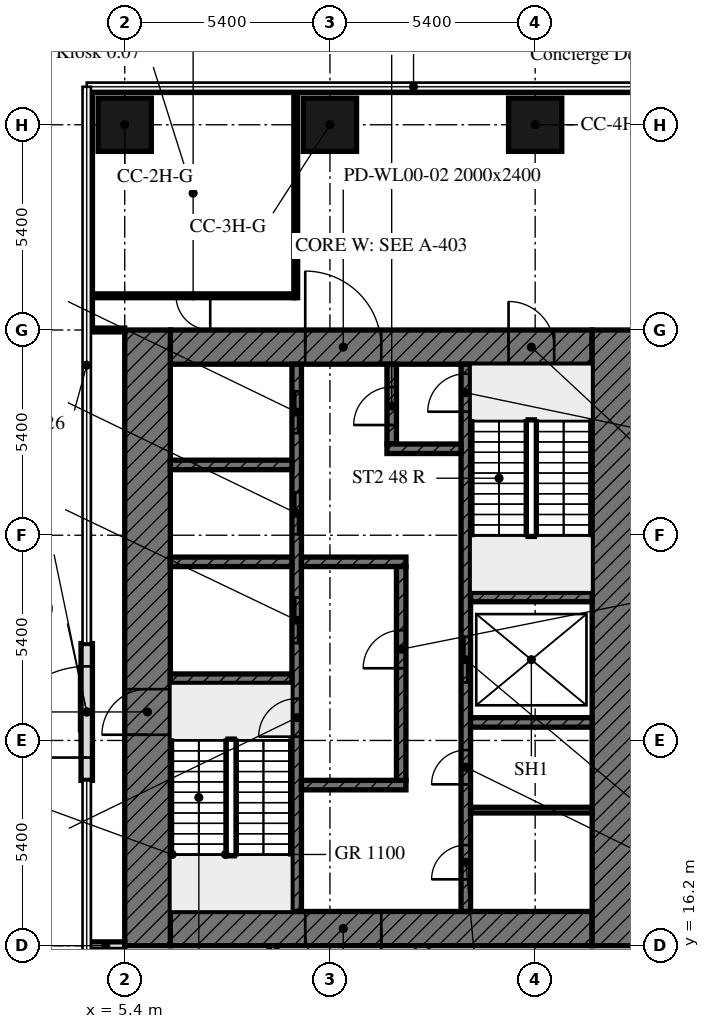
"""IFC4 building model, lengths in metres.
Left out: names, types, materials, properties, quantities, classifications, styles, units other than length and angle.
Written with IfcOpenShell. Run it as: python <this file> out.ifc"""

import sys

from ifc_helpers import new_model, si_unit, direction, frame, frame_2d, origin, origin_2d, place, context, subcontext, project, spatial, rectangle, extrude, element, fill, save


model = new_model("IFC4")
c1 = context("Model", 3, precision=1e-05, world=origin(), true_north=direction((0.0, 1.0)))
c2 = subcontext(c1, "Body", "Model", "MODEL_VIEW")
j1 = project(units=[si_unit("LENGTHUNIT", "METRE"), si_unit("PLANEANGLEUNIT", "RADIAN")], contexts=[c1])
p1 = place(None, origin())
s1 = spatial("IfcSite", under=j1, at=p1, CompositionType="ELEMENT")
p2 = place(p1, origin())
s2 = spatial("IfcBuilding", under=s1, at=p2, CompositionType="ELEMENT")
p3 = place(p2, origin())
s3 = spatial("IfcBuildingStorey", under=s2, at=p3, CompositionType="ELEMENT", Elevation=0.0)
for number, where, z_axis, x_axis in (
    (1, (5.4, 37.8, 0.0), (0.0, 0.0, 1.0), (1.0, 0.0, 0.0)),
    (2, (10.8, 37.8, 0.0), (0.0, 0.0, 1.0), (1.0, 0.0, 0.0)),
    (3, (16.2, 37.8, 0.0), (0.0, 0.0, 1.0), (1.0, 0.0, 0.0)),
):
    element("IfcColumn", number, at=place(p3, frame(where, z_axis=z_axis, x_axis=x_axis)), inside=s3, PredefinedType="COLUMN", context=c2, shape_type="SweptSolid", body=[
        extrude(rectangle(XDim=1.4, YDim=1.4, at=origin_2d()), origin(), (0.0, 0.0, 1.0), 8.0),
    ])
p4 = place(p3, frame((4.4, 20.55, 0.0), z_axis=(0.0, 0.0, 1.0), x_axis=(0.0, 1.0, 0.0)))
e4 = element("IfcWall", 4, at=p4, inside=s3, PredefinedType="SOLIDWALL", context=c2, shape_type="SweptSolid", body=[
    extrude(rectangle(XDim=3.6, YDim=0.3, at=frame_2d((1.8, 0.0))), origin(), (0.0, 0.0, 1.0), 8.0),
])
p5 = place(p4, frame((0.6, 0.0, 0.0)))
e5 = element("IfcOpeningElement", 5, at=p5, cuts=e4, PredefinedType="OPENING", context=c2, shape_type="SweptSolid", body=[
    extrude(rectangle(XDim=2.4, YDim=2.7, at=frame_2d((1.2, 1.35))), frame((0.0, 0.16, 0.0), z_axis=(0.0, -1.0, 0.0), x_axis=(1.0, 0.0, 0.0)), (0.0, 0.0, 1.0), 0.32),
])
p6 = place(p3, frame((17.7, 16.65, 0.0), z_axis=(0.0, 0.0, 1.0), x_axis=(-1.0, 0.0, 0.0)))
e6 = element("IfcWall", 6, at=p6, inside=s3, PredefinedType="SOLIDWALL", context=c2, shape_type="SweptSolid", body=[
    extrude(rectangle(XDim=11.1, YDim=0.9, at=frame_2d((5.55, 0.0))), origin(), (0.0, 0.0, 1.0), 8.0),
])
p7 = place(p6, frame((5.55, 0.0, 0.0)))
e7 = element("IfcOpeningElement", 7, at=p7, cuts=e6, PredefinedType="OPENING", context=c2, shape_type="SweptSolid", body=[
    extrude(rectangle(XDim=2.0, YDim=2.4, at=frame_2d((1.0, 1.2))), frame((0.0, 0.45, 0.0), z_axis=(0.0, -1.0, 0.0), x_axis=(1.0, 0.0, 0.0)), (0.0, 0.0, 1.0), 0.9),
])
p8 = place(p3, frame((6.6, 31.95, 0.0), z_axis=(0.0, 0.0, 1.0), x_axis=(1.0, 0.0, 0.0)))
e8 = element("IfcWall", 8, at=p8, inside=s3, PredefinedType="SOLIDWALL", context=c2, shape_type="SweptSolid", body=[
    extrude(rectangle(XDim=11.1, YDim=0.9, at=frame_2d((5.55, 0.0))), origin(), (0.0, 0.0, 1.0), 8.0),
])
p9 = place(p8, frame((3.55, 0.0, 0.0)))
e9 = element("IfcOpeningElement", 9, at=p9, cuts=e8, PredefinedType="OPENING", context=c2, shape_type="SweptSolid", body=[
    extrude(rectangle(XDim=2.0, YDim=2.4, at=frame_2d((1.0, 1.2))), frame((0.0, 0.45, 0.0), z_axis=(0.0, -1.0, 0.0), x_axis=(1.0, 0.0, 0.0)), (0.0, 0.0, 1.0), 0.9),
])
p10 = place(p8, frame((8.9, 0.0, 0.0)))
e10 = element("IfcOpeningElement", 10, at=p10, cuts=e8, PredefinedType="OPENING", context=c2, shape_type="SweptSolid", body=[
    extrude(rectangle(XDim=1.2, YDim=2.1, at=frame_2d((0.6, 1.05))), frame((0.0, 0.45, 0.0), z_axis=(0.0, -1.0, 0.0), x_axis=(1.0, 0.0, 0.0)), (0.0, 0.0, 1.0), 0.9),
])
p11 = place(p3, frame((6.0, 16.2, 0.0), z_axis=(0.0, 0.0, 1.0), x_axis=(0.0, 1.0, 0.0)))
e11 = element("IfcWall", 11, at=p11, inside=s3, PredefinedType="SOLIDWALL", context=c2, shape_type="SweptSolid", body=[
    extrude(rectangle(XDim=16.2, YDim=1.2, at=frame_2d((8.1, 0.0))), origin(), (0.0, 0.0, 1.0), 8.0),
])
p12 = place(p11, frame((5.55, 0.0, 0.0)))
e12 = element("IfcOpeningElement", 12, at=p12, cuts=e11, PredefinedType="OPENING", context=c2, shape_type="SweptSolid", body=[
    extrude(rectangle(XDim=1.2, YDim=2.1, at=frame_2d((0.6, 1.05))), frame((0.0, 0.6, 0.0), z_axis=(0.0, -1.0, 0.0), x_axis=(1.0, 0.0, 0.0)), (0.0, 0.0, 1.0), 1.2),
])
p13 = place(p3, frame((18.3, 32.4, 0.0), z_axis=(0.0, 0.0, 1.0), x_axis=(0.0, -1.0, 0.0)))
e13 = element("IfcWall", 13, at=p13, inside=s3, PredefinedType="SOLIDWALL", context=c2, shape_type="SweptSolid", body=[
    extrude(rectangle(XDim=16.2, YDim=1.2, at=frame_2d((8.1, 0.0))), origin(), (0.0, 0.0, 1.0), 8.0),
])
p14 = place(p3, frame((9.925, 17.1, 0.0), z_axis=(0.0, 0.0, 1.0), x_axis=(0.0, 1.0, 0.0)))
e14 = element("IfcWall", 14, at=p14, inside=s3, PredefinedType="SOLIDWALL", context=c2, shape_type="SweptSolid", body=[
    extrude(rectangle(XDim=14.4, YDim=0.25, at=frame_2d((7.2, 0.0))), origin(), (0.0, 0.0, 1.0), 8.0),
])
p15 = place(p14, frame((4.6, 0.0, 0.0)))
e15 = element("IfcOpeningElement", 15, at=p15, cuts=e14, PredefinedType="OPENING", context=c2, shape_type="SweptSolid", body=[
    extrude(rectangle(XDim=1.0, YDim=2.1, at=frame_2d((0.5, 1.05))), frame((0.0, 0.125, 0.0), z_axis=(0.0, -1.0, 0.0), x_axis=(1.0, 0.0, 0.0)), (0.0, 0.0, 1.0), 0.25),
])
p16 = place(p14, frame((7.062, 0.0, 0.0)))
e16 = element("IfcOpeningElement", 16, at=p16, cuts=e14, PredefinedType="OPENING", context=c2, shape_type="SweptSolid", body=[
    extrude(rectangle(XDim=1.2, YDim=2.1, at=frame_2d((0.6, 1.05))), frame((0.0, 0.125, 0.0), z_axis=(0.0, -1.0, 0.0), x_axis=(1.0, 0.0, 0.0)), (0.0, 0.0, 1.0), 0.25),
])
p17 = place(p14, frame((9.925, 0.0, 0.0)))
e17 = element("IfcOpeningElement", 17, at=p17, cuts=e14, PredefinedType="OPENING", context=c2, shape_type="SweptSolid", body=[
    extrude(rectangle(XDim=1.1, YDim=2.1, at=frame_2d((0.55, 1.05))), frame((0.0, 0.125, 0.0), z_axis=(0.0, -1.0, 0.0), x_axis=(1.0, 0.0, 0.0)), (0.0, 0.0, 1.0), 0.25),
])
p18 = place(p14, frame((12.587, 0.0, 0.0)))
e18 = element("IfcOpeningElement", 18, at=p18, cuts=e14, PredefinedType="OPENING", context=c2, shape_type="SweptSolid", body=[
    extrude(rectangle(XDim=1.1, YDim=2.1, at=frame_2d((0.55, 1.05))), frame((0.0, 0.125, 0.0), z_axis=(0.0, -1.0, 0.0), x_axis=(1.0, 0.0, 0.0)), (0.0, 0.0, 1.0), 0.25),
])
p19 = place(p3, frame((14.375, 17.1, 0.0), z_axis=(0.0, 0.0, 1.0), x_axis=(0.0, 1.0, 0.0)))
e19 = element("IfcWall", 19, at=p19, inside=s3, PredefinedType="SOLIDWALL", context=c2, shape_type="SweptSolid", body=[
    extrude(rectangle(XDim=14.4, YDim=0.25, at=frame_2d((7.2, 0.0))), origin(), (0.0, 0.0, 1.0), 8.0),
])
p20 = place(p19, frame((13.15, 0.0, 0.0)))
e20 = element("IfcOpeningElement", 20, at=p20, cuts=e19, PredefinedType="OPENING", context=c2, shape_type="SweptSolid", body=[
    extrude(rectangle(XDim=1.0, YDim=2.1, at=frame_2d((0.5, 1.05))), frame((0.0, 0.125, 0.0), z_axis=(0.0, -1.0, 0.0), x_axis=(1.0, 0.0, 0.0)), (0.0, 0.0, 1.0), 0.25),
])
p21 = place(p19, frame((6.025, 0.0, 0.0)))
e21 = element("IfcOpeningElement", 21, at=p21, cuts=e19, PredefinedType="OPENING", context=c2, shape_type="SweptSolid", body=[
    extrude(rectangle(XDim=1.2, YDim=2.1, at=frame_2d((0.6, 1.05))), frame((0.0, 0.125, 0.0), z_axis=(0.0, -1.0, 0.0), x_axis=(1.0, 0.0, 0.0)), (0.0, 0.0, 1.0), 0.25),
])
p22 = place(p19, frame((0.846, 0.0, 0.0)))
e22 = element("IfcOpeningElement", 22, at=p22, cuts=e19, PredefinedType="OPENING", context=c2, shape_type="SweptSolid", body=[
    extrude(rectangle(XDim=0.9, YDim=2.1, at=frame_2d((0.45, 1.05))), frame((0.0, 0.125, 0.0), z_axis=(0.0, -1.0, 0.0), x_axis=(1.0, 0.0, 0.0)), (0.0, 0.0, 1.0), 0.25),
])
p23 = place(p19, frame((3.346, 0.0, 0.0)))
e23 = element("IfcOpeningElement", 23, at=p23, cuts=e19, PredefinedType="OPENING", context=c2, shape_type="SweptSolid", body=[
    extrude(rectangle(XDim=0.9, YDim=2.1, at=frame_2d((0.45, 1.05))), frame((0.0, 0.125, 0.0), z_axis=(0.0, -1.0, 0.0), x_axis=(1.0, 0.0, 0.0)), (0.0, 0.0, 1.0), 0.25),
])
for number, where, z_axis, x_axis in (
    (24, (6.6, 23.225, 0.0), (0.0, 0.0, 1.0), (1.0, 0.0, 0.0)),
    (25, (14.5, 25.375, 0.0), (0.0, 0.0, 1.0), (1.0, 0.0, 0.0)),
    (26, (14.5, 22.075, 0.0), (0.0, 0.0, 1.0), (1.0, 0.0, 0.0)),
    (27, (6.6, 26.3, 0.0), (0.0, 0.0, 1.0), (1.0, 0.0, 0.0)),
):
    element("IfcWall", number, at=place(p3, frame(where, z_axis=z_axis, x_axis=x_axis)), inside=s3, PredefinedType="SOLIDWALL", context=c2, shape_type="SweptSolid", body=[
        extrude(rectangle(XDim=3.2, YDim=0.25, at=frame_2d((1.6, 0.0))), origin(), (0.0, 0.0, 1.0), 8.0),
    ])
for number, where, z_axis, x_axis in (
    (28, (10.05, 26.3, 0.0), (0.0, 0.0, 1.0), (1.0, 0.0, 0.0)),
    (29, (10.05, 20.425, 0.0), (0.0, 0.0, 1.0), (1.0, 0.0, 0.0)),
):
    element("IfcWall", number, at=place(p3, frame(where, z_axis=z_axis, x_axis=x_axis)), inside=s3, PredefinedType="SOLIDWALL", context=c2, shape_type="SweptSolid", body=[
        extrude(rectangle(XDim=2.75, YDim=0.25, at=frame_2d((1.375, 0.0))), origin(), (0.0, 0.0, 1.0), 8.0),
    ])
p24 = place(p3, frame((12.425, 29.4, 0.0), z_axis=(0.0, 0.0, 1.0), x_axis=(0.0, 1.0, 0.0)))
e30 = element("IfcWall", 30, at=p24, inside=s3, PredefinedType="SOLIDWALL", context=c2, shape_type="SweptSolid", body=[
    extrude(rectangle(XDim=2.1, YDim=0.25, at=frame_2d((1.05, 0.0))), origin(), (0.0, 0.0, 1.0), 8.0),
])
p25 = place(p24, frame((0.5, 0.0, 0.0)))
e31 = element("IfcOpeningElement", 31, at=p25, cuts=e30, PredefinedType="OPENING", context=c2, shape_type="SweptSolid", body=[
    extrude(rectangle(XDim=1.0, YDim=2.1, at=frame_2d((0.5, 1.05))), frame((0.0, 0.125, 0.0), z_axis=(0.0, -1.0, 0.0), x_axis=(1.0, 0.0, 0.0)), (0.0, 0.0, 1.0), 0.25),
])
p26 = place(p3, frame((12.3, 29.275, 0.0), z_axis=(0.0, 0.0, 1.0), x_axis=(1.0, 0.0, 0.0)))
e32 = element("IfcWall", 32, at=p26, inside=s3, PredefinedType="SOLIDWALL", context=c2, shape_type="SweptSolid", body=[
    extrude(rectangle(XDim=1.95, YDim=0.25, at=frame_2d((0.975, 0.0))), origin(), (0.0, 0.0, 1.0), 8.0),
])
p27 = place(p3, frame((12.675, 20.55, 0.0), z_axis=(0.0, 0.0, 1.0), x_axis=(0.0, 1.0, 0.0)))
e33 = element("IfcWall", 33, at=p27, inside=s3, PredefinedType="SOLIDWALL", context=c2, shape_type="SweptSolid", body=[
    extrude(rectangle(XDim=5.625, YDim=0.25, at=frame_2d((2.812, 0.0))), origin(), (0.0, 0.0, 1.0), 8.0),
])
p28 = place(p27, frame((2.95, 0.0, 0.0)))
e34 = element("IfcOpeningElement", 34, at=p28, cuts=e33, PredefinedType="OPENING", context=c2, shape_type="SweptSolid", body=[
    extrude(rectangle(XDim=1.0, YDim=2.1, at=frame_2d((0.5, 1.05))), frame((0.0, 0.125, 0.0), z_axis=(0.0, -1.0, 0.0), x_axis=(1.0, 0.0, 0.0)), (0.0, 0.0, 1.0), 0.25),
])
p29 = place(p3, frame((6.6, 28.85, 0.0), z_axis=(0.0, 0.0, 1.0), x_axis=(1.0, 0.0, 0.0)))
e35 = element("IfcWall", 35, at=p29, inside=s3, PredefinedType="SOLIDWALL", context=c2, shape_type="SweptSolid", body=[
    extrude(rectangle(XDim=3.2, YDim=0.25, at=frame_2d((1.6, 0.0))), origin(), (0.0, 0.0, 1.0), 8.0),
])
p30 = place(p3, frame((14.5, 19.767, 0.0), z_axis=(0.0, 0.0, 1.0), x_axis=(1.0, 0.0, 0.0)))
e36 = element("IfcWall", 36, at=p30, inside=s3, PredefinedType="PARTITIONING", context=c2, shape_type="SweptSolid", body=[
    extrude(rectangle(XDim=3.2, YDim=0.15, at=frame_2d((1.6, 0.0))), origin(), (0.0, 0.0, 1.0), 8.0),
])
p31 = place(p3, frame((9.3, 9.8, 0.0), z_axis=(0.0, 0.0, 1.0), x_axis=(0.0, 1.0, 0.0)))
e37 = element("IfcWall", 37, at=p31, inside=s3, PredefinedType="PARTITIONING", context=c2, shape_type="SweptSolid", body=[
    extrude(rectangle(XDim=6.4, YDim=0.2, at=frame_2d((3.2, 0.0))), origin(), (0.0, 0.0, 1.0), 7.25),
])
p32 = place(p31, frame((4.375, 0.0, 0.0)))
e38 = element("IfcOpeningElement", 38, at=p32, cuts=e37, PredefinedType="OPENING", context=c2, shape_type="SweptSolid", body=[
    extrude(rectangle(XDim=0.9, YDim=2.1, at=frame_2d((0.45, 1.05))), frame((0.0, 0.1, 0.0), z_axis=(0.0, -1.0, 0.0), x_axis=(1.0, 0.0, 0.0)), (0.0, 0.0, 1.0), 0.2),
])
p33 = place(p3, frame((5.4, 16.2, 0.0), z_axis=(0.0, 0.0, 1.0), x_axis=(-1.0, 0.0, 0.0)))
e39 = element("IfcWall", 39, at=p33, inside=s3, PredefinedType="PARTITIONING", context=c2, shape_type="SweptSolid", body=[
    extrude(rectangle(XDim=1.0, YDim=0.2, at=frame_2d((0.5, 0.0))), origin(), (0.0, 0.0, 1.0), 7.25),
])
p34 = place(p3, frame((4.5, 16.1, 0.0), z_axis=(0.0, 0.0, 1.0), x_axis=(0.0, -1.0, 0.0)))
e40 = element("IfcWall", 40, at=p34, inside=s3, PredefinedType="PARTITIONING", context=c2, shape_type="SweptSolid", body=[
    extrude(rectangle(XDim=6.3, YDim=0.2, at=frame_2d((3.15, 0.0))), origin(), (0.0, 0.0, 1.0), 7.25),
])
p35 = place(p3, frame((9.9, 38.65, 0.0), z_axis=(0.0, 0.0, 1.0), x_axis=(0.0, -1.0, 0.0)))
e41 = element("IfcWall", 41, at=p35, inside=s3, PredefinedType="PARTITIONING", context=c2, shape_type="SweptSolid", body=[
    extrude(rectangle(XDim=5.4, YDim=0.1, at=frame_2d((2.7, 0.0))), origin(), (0.0, 0.0, 1.0), 8.0),
])
p36 = place(p3, frame((9.85, 33.3, 0.0), z_axis=(0.0, 0.0, 1.0), x_axis=(-1.0, 0.0, 0.0)))
e42 = element("IfcWall", 42, at=p36, inside=s3, PredefinedType="PARTITIONING", context=c2, shape_type="SweptSolid", body=[
    extrude(rectangle(XDim=5.3, YDim=0.1, at=frame_2d((2.65, 0.0))), origin(), (0.0, 0.0, 1.0), 8.0),
])
p37 = place(p36, frame((2.2, 0.0, 0.0)))
e43 = element("IfcOpeningElement", 43, at=p37, cuts=e42, PredefinedType="OPENING", context=c2, shape_type="SweptSolid", body=[
    extrude(rectangle(XDim=0.9, YDim=2.1, at=frame_2d((0.45, 1.05))), frame((0.0, 0.05, 0.0), z_axis=(0.0, -1.0, 0.0), x_axis=(1.0, 0.0, 0.0)), (0.0, 0.0, 1.0), 0.1),
])
p38 = place(p3, frame((4.4, 32.4, 0.0), z_axis=(0.0, 0.0, 1.0), x_axis=(1.0, 0.0, 0.0)))
e44 = element("IfcWall", 44, at=p38, inside=s3, PredefinedType="PARTITIONING", context=c2, shape_type="SweptSolid", body=[
    extrude(rectangle(XDim=1.0, YDim=0.1, at=frame_2d((0.5, 0.0))), origin(), (0.0, 0.0, 1.0), 7.25),
])
p39 = place(p3, frame((21.6, 38.7, 0.0), z_axis=(0.0, 0.0, 1.0), x_axis=(-1.0, 0.0, 0.0)))
e45 = element("IfcWall", 45, at=p39, inside=s3, PredefinedType="PARTITIONING", context=c2, shape_type="SweptSolid", body=[
    extrude(rectangle(XDim=17.2, YDim=0.1, at=frame_2d((8.6, 0.0))), origin(), (0.0, 0.0, 1.0), 8.0),
])
p40 = place(p3, frame((4.5, 38.65, 0.0), z_axis=(0.0, 0.0, 1.0), x_axis=(0.0, -1.0, 0.0)))
e46 = element("IfcWall", 46, at=p40, inside=s3, PredefinedType="PARTITIONING", context=c2, shape_type="SweptSolid", body=[
    extrude(rectangle(XDim=6.2, YDim=0.1, at=frame_2d((3.1, 0.0))), origin(), (0.0, 0.0, 1.0), 8.0),
])
p41 = place(p5, origin())
e47 = element("IfcDoor", 47, at=p41, inside=s3, OperationType="DOUBLE_DOOR_DOUBLE_SWING", PredefinedType="DOOR", context=c2, shape_type="SweptSolid", body=[
    extrude(rectangle(XDim=2.4, YDim=2.7, at=frame_2d((1.2, 1.35))), frame((0.0, 0.025, 0.0), z_axis=(0.0, -1.0, 0.0), x_axis=(1.0, 0.0, 0.0)), (0.0, 0.0, 1.0), 0.05),
])
fill(e5, e47)
p42 = place(p7, origin())
e48 = element("IfcDoor", 48, at=p42, inside=s3, OperationType="DOUBLE_DOOR_SINGLE_SWING", PredefinedType="DOOR", context=c2, shape_type="SweptSolid", body=[
    extrude(rectangle(XDim=2.0, YDim=2.4, at=frame_2d((1.0, 1.2))), frame((0.0, 0.025, 0.0), z_axis=(0.0, -1.0, 0.0), x_axis=(1.0, 0.0, 0.0)), (0.0, 0.0, 1.0), 0.05),
])
fill(e7, e48)
p43 = place(p9, origin())
e49 = element("IfcDoor", 49, at=p43, inside=s3, OperationType="DOUBLE_DOOR_SINGLE_SWING", PredefinedType="DOOR", context=c2, shape_type="SweptSolid", body=[
    extrude(rectangle(XDim=2.0, YDim=2.4, at=frame_2d((1.0, 1.2))), frame((0.0, 0.025, 0.0), z_axis=(0.0, -1.0, 0.0), x_axis=(1.0, 0.0, 0.0)), (0.0, 0.0, 1.0), 0.05),
])
fill(e9, e49)
p44 = place(p15, origin())
e50 = element("IfcDoor", 50, at=p44, inside=s3, OperationType="SINGLE_SWING_LEFT", PredefinedType="DOOR", context=c2, shape_type="SweptSolid", body=[
    extrude(rectangle(XDim=1.0, YDim=2.1, at=frame_2d((0.5, 1.05))), frame((0.0, 0.025, 0.0), z_axis=(0.0, -1.0, 0.0), x_axis=(1.0, 0.0, 0.0)), (0.0, 0.0, 1.0), 0.05),
])
fill(e15, e50)
p45 = place(p28, origin())
e51 = element("IfcDoor", 51, at=p45, inside=s3, OperationType="SINGLE_SWING_LEFT", PredefinedType="DOOR", context=c2, shape_type="SweptSolid", body=[
    extrude(rectangle(XDim=1.0, YDim=2.1, at=frame_2d((0.5, 1.05))), frame((0.0, 0.025, 0.0), z_axis=(0.0, -1.0, 0.0), x_axis=(1.0, 0.0, 0.0)), (0.0, 0.0, 1.0), 0.05),
])
fill(e34, e51)
p46 = place(p20, origin())
e52 = element("IfcDoor", 52, at=p46, inside=s3, OperationType="SINGLE_SWING_LEFT", PredefinedType="DOOR", context=c2, shape_type="SweptSolid", body=[
    extrude(rectangle(XDim=1.0, YDim=2.1, at=frame_2d((0.5, 1.05))), frame((0.0, 0.025, 0.0), z_axis=(0.0, -1.0, 0.0), x_axis=(1.0, 0.0, 0.0)), (0.0, 0.0, 1.0), 0.05),
])
fill(e20, e52)
p47 = place(p25, origin())
e53 = element("IfcDoor", 53, at=p47, inside=s3, OperationType="SINGLE_SWING_LEFT", PredefinedType="DOOR", context=c2, shape_type="SweptSolid", body=[
    extrude(rectangle(XDim=1.0, YDim=2.1, at=frame_2d((0.5, 1.05))), frame((0.0, 0.025, 0.0), z_axis=(0.0, -1.0, 0.0), x_axis=(1.0, 0.0, 0.0)), (0.0, 0.0, 1.0), 0.05),
])
fill(e31, e53)
p48 = place(p16, origin())
e54 = element("IfcDoor", 54, at=p48, inside=s3, OperationType="DOUBLE_DOOR_SLIDING", PredefinedType="DOOR", context=c2, shape_type="SweptSolid", body=[
    extrude(rectangle(XDim=1.2, YDim=2.1, at=frame_2d((0.6, 1.05))), frame((0.0, 0.025, 0.0), z_axis=(0.0, -1.0, 0.0), x_axis=(1.0, 0.0, 0.0)), (0.0, 0.0, 1.0), 0.05),
])
fill(e16, e54)
p49 = place(p17, origin())
e55 = element("IfcDoor", 55, at=p49, inside=s3, OperationType="DOUBLE_DOOR_SLIDING", PredefinedType="DOOR", context=c2, shape_type="SweptSolid", body=[
    extrude(rectangle(XDim=1.1, YDim=2.1, at=frame_2d((0.55, 1.05))), frame((0.0, 0.025, 0.0), z_axis=(0.0, -1.0, 0.0), x_axis=(1.0, 0.0, 0.0)), (0.0, 0.0, 1.0), 0.05),
])
fill(e17, e55)
p50 = place(p18, origin())
e56 = element("IfcDoor", 56, at=p50, inside=s3, OperationType="DOUBLE_DOOR_SLIDING", PredefinedType="DOOR", context=c2, shape_type="SweptSolid", body=[
    extrude(rectangle(XDim=1.1, YDim=2.1, at=frame_2d((0.55, 1.05))), frame((0.0, 0.025, 0.0), z_axis=(0.0, -1.0, 0.0), x_axis=(1.0, 0.0, 0.0)), (0.0, 0.0, 1.0), 0.05),
])
fill(e18, e56)
p51 = place(p21, origin())
e57 = element("IfcDoor", 57, at=p51, inside=s3, OperationType="DOUBLE_DOOR_SLIDING", PredefinedType="DOOR", context=c2, shape_type="SweptSolid", body=[
    extrude(rectangle(XDim=1.2, YDim=2.1, at=frame_2d((0.6, 1.05))), frame((0.0, 0.025, 0.0), z_axis=(0.0, -1.0, 0.0), x_axis=(1.0, 0.0, 0.0)), (0.0, 0.0, 1.0), 0.05),
])
fill(e21, e57)
p52 = place(p22, origin())
e58 = element("IfcDoor", 58, at=p52, inside=s3, OperationType="SINGLE_SWING_LEFT", PredefinedType="DOOR", context=c2, shape_type="SweptSolid", body=[
    extrude(rectangle(XDim=0.9, YDim=2.1, at=frame_2d((0.45, 1.05))), frame((0.0, 0.025, 0.0), z_axis=(0.0, -1.0, 0.0), x_axis=(1.0, 0.0, 0.0)), (0.0, 0.0, 1.0), 0.05),
])
fill(e22, e58)
p53 = place(p23, origin())
e59 = element("IfcDoor", 59, at=p53, inside=s3, OperationType="SINGLE_SWING_LEFT", PredefinedType="DOOR", context=c2, shape_type="SweptSolid", body=[
    extrude(rectangle(XDim=0.9, YDim=2.1, at=frame_2d((0.45, 1.05))), frame((0.0, 0.025, 0.0), z_axis=(0.0, -1.0, 0.0), x_axis=(1.0, 0.0, 0.0)), (0.0, 0.0, 1.0), 0.05),
])
fill(e23, e59)
p54 = place(p12, origin())
e60 = element("IfcDoor", 60, at=p54, inside=s3, OperationType="DOUBLE_DOOR_SINGLE_SWING", PredefinedType="DOOR", context=c2, shape_type="SweptSolid", body=[
    extrude(rectangle(XDim=1.2, YDim=2.1, at=frame_2d((0.6, 1.05))), frame((0.0, 0.025, 0.0), z_axis=(0.0, -1.0, 0.0), x_axis=(1.0, 0.0, 0.0)), (0.0, 0.0, 1.0), 0.05),
])
fill(e12, e60)
p55 = place(p10, origin())
e61 = element("IfcDoor", 61, at=p55, inside=s3, OperationType="DOUBLE_DOOR_SINGLE_SWING", PredefinedType="DOOR", context=c2, shape_type="SweptSolid", body=[
    extrude(rectangle(XDim=1.2, YDim=2.1, at=frame_2d((0.6, 1.05))), frame((0.0, 0.025, 0.0), z_axis=(0.0, -1.0, 0.0), x_axis=(1.0, 0.0, 0.0)), (0.0, 0.0, 1.0), 0.05),
])
fill(e10, e61)
p56 = place(p37, origin())
e62 = element("IfcDoor", 62, at=p56, inside=s3, OperationType="SINGLE_SWING_RIGHT", PredefinedType="DOOR", context=c2, shape_type="SweptSolid", body=[
    extrude(rectangle(XDim=0.9, YDim=2.1, at=frame_2d((0.45, 1.05))), frame((0.0, 0.025, 0.0), z_axis=(0.0, -1.0, 0.0), x_axis=(1.0, 0.0, 0.0)), (0.0, 0.0, 1.0), 0.05),
])
fill(e43, e62)
save(model, sys.argv[1])
